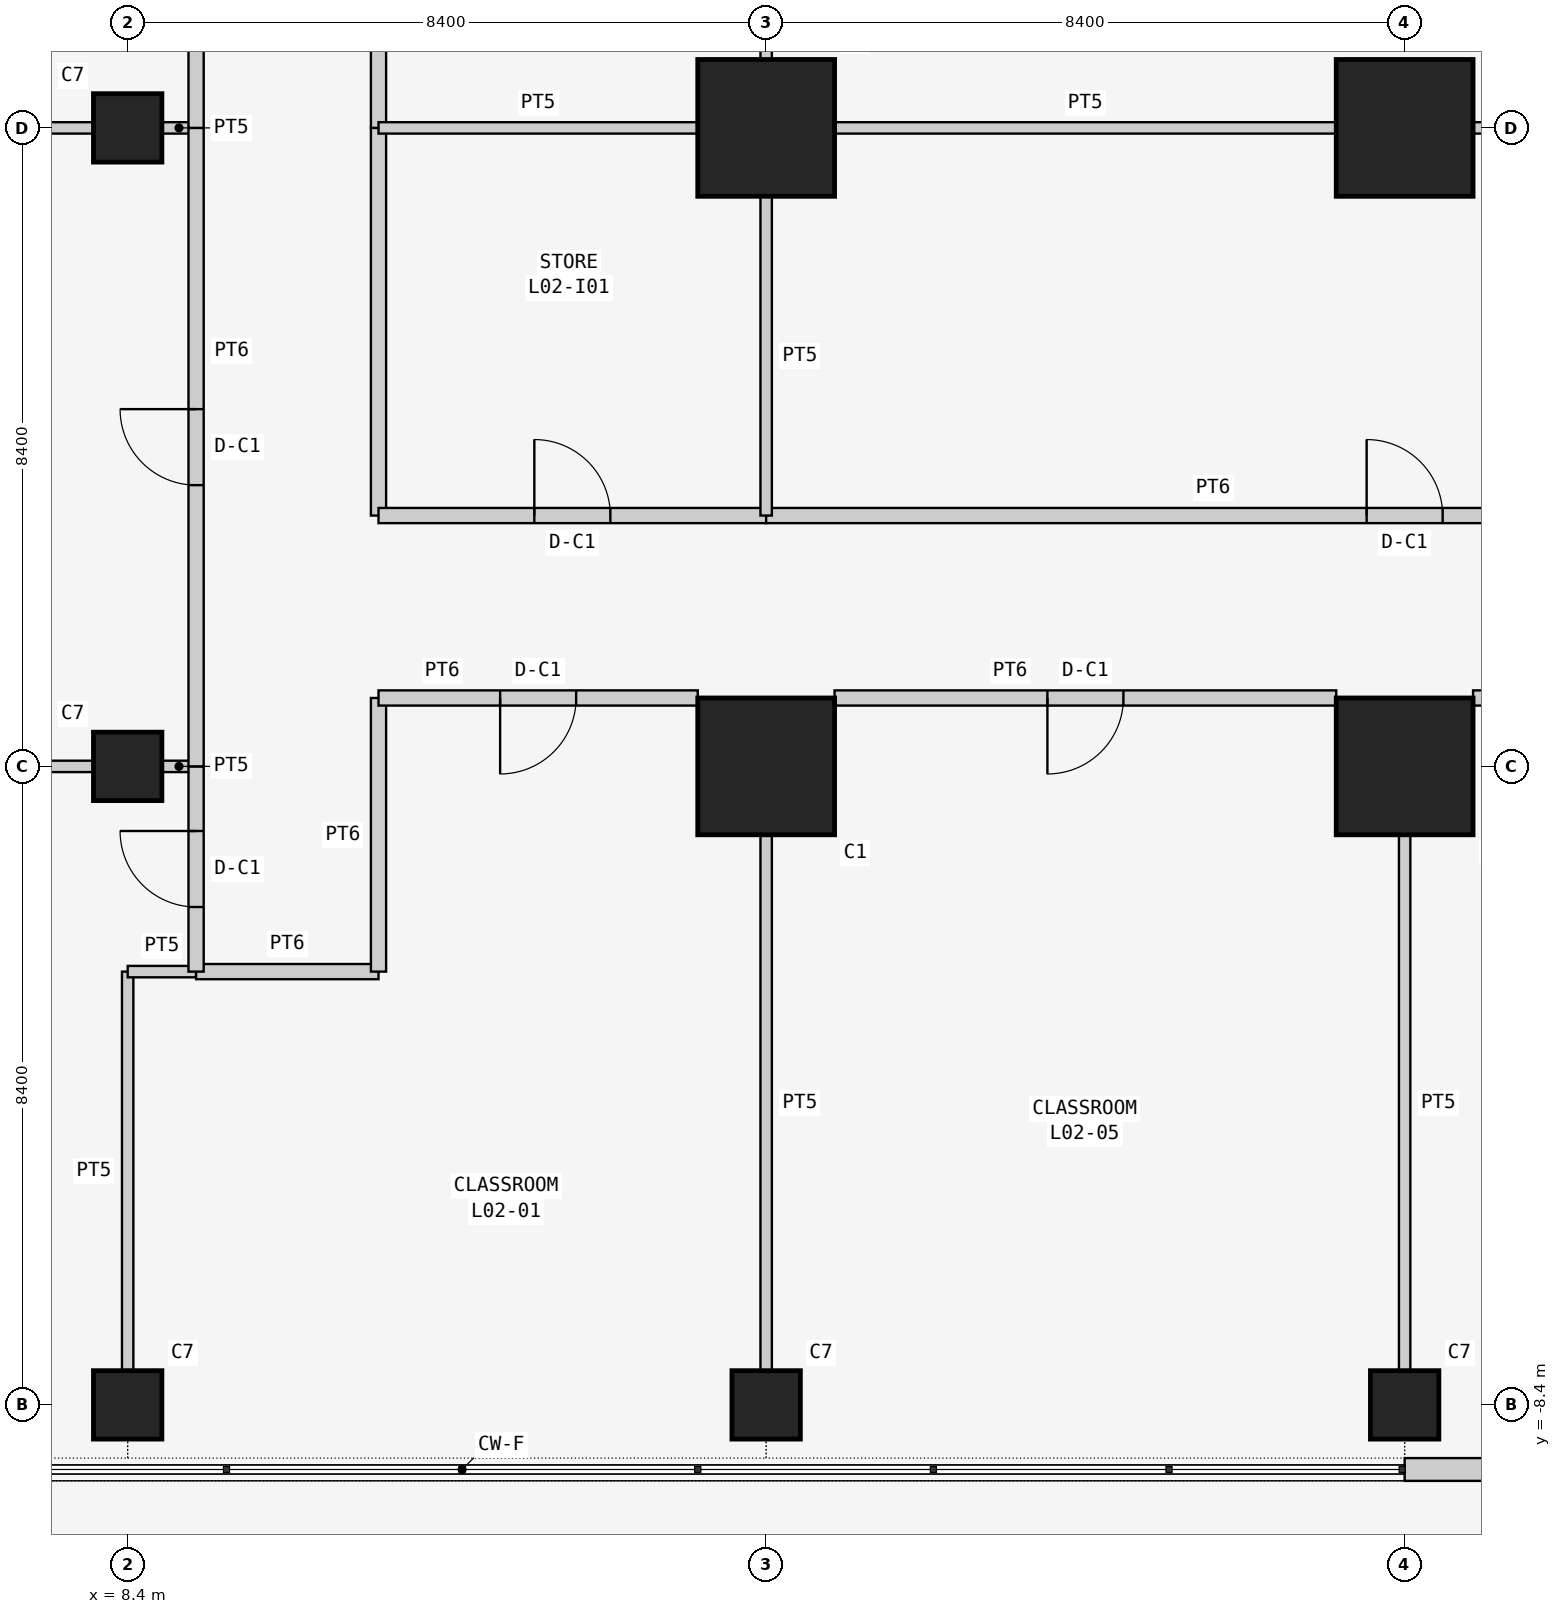
"""IFC4 building model, lengths in metres.
Left out: names, types, materials, properties, quantities, classifications, styles, units other than length and angle.
Written with IfcOpenShell. Run it as: python <this file> out.ifc"""

import sys

from ifc_helpers import new_model, si_unit, direction, frame, frame_2d, origin, origin_2d, place, context, subcontext, project, spatial, rectangle, extrude, element, fill, save


model = new_model("IFC4")
c1 = context("Model", 3, precision=1e-05, world=origin(), true_north=direction((0.0, 1.0)))
c2 = subcontext(c1, "Body", "Model", "MODEL_VIEW")
j1 = project(units=[si_unit("LENGTHUNIT", "METRE"), si_unit("PLANEANGLEUNIT", "RADIAN")], contexts=[c1])
p1 = place(None, origin())
s1 = spatial("IfcSite", under=j1, at=p1, CompositionType="ELEMENT")
p2 = place(p1, origin())
s2 = spatial("IfcBuilding", under=s1, at=p2, CompositionType="ELEMENT")
p3 = place(p2, frame((0.0, 0.0, 10.5)))
s3 = spatial("IfcBuildingStorey", under=s2, at=p3, CompositionType="ELEMENT", Elevation=10.5)
for number, where, z_axis, x_axis in (
    (1, (8.4, -8.4, 0.0), (0.0, 0.0, 1.0), (1.0, 0.0, 0.0)),
    (2, (8.4, 0.0, 0.0), (0.0, 0.0, 1.0), (1.0, 0.0, 0.0)),
    (3, (8.4, 8.4, 0.0), (0.0, 0.0, 1.0), (1.0, 0.0, 0.0)),
    (4, (16.8, -8.4, 0.0), (0.0, 0.0, 1.0), (1.0, 0.0, 0.0)),
):
    element("IfcColumn", number, at=place(p3, frame(where, z_axis=z_axis, x_axis=x_axis)), inside=s3, PredefinedType="COLUMN", context=c2, shape_type="SweptSolid", body=[
        extrude(rectangle(XDim=0.9, YDim=0.9, at=origin_2d()), origin(), (0.0, 0.0, 1.0), 4.5),
    ])
for number, where, z_axis, x_axis in (
    (5, (16.8, 0.0, 0.0), (0.0, 0.0, 1.0), (1.0, 0.0, 0.0)),
    (6, (16.8, 8.4, 0.0), (0.0, 0.0, 1.0), (1.0, 0.0, 0.0)),
):
    element("IfcColumn", number, at=place(p3, frame(where, z_axis=z_axis, x_axis=x_axis)), inside=s3, PredefinedType="COLUMN", context=c2, shape_type="SweptSolid", body=[
        extrude(rectangle(XDim=1.8, YDim=1.8, at=origin_2d()), origin(), (0.0, 0.0, 1.0), 4.5),
    ])
p4 = place(p3, frame((25.2, -8.4, 0.0), z_axis=(0.0, 0.0, 1.0), x_axis=(1.0, 0.0, 0.0)))
e7 = element("IfcColumn", 7, at=p4, inside=s3, PredefinedType="COLUMN", context=c2, shape_type="SweptSolid", body=[
    extrude(rectangle(XDim=0.9, YDim=0.9, at=origin_2d()), origin(), (0.0, 0.0, 1.0), 4.5),
])
for number, where, z_axis, x_axis in (
    (8, (25.2, 0.0, 0.0), (0.0, 0.0, 1.0), (1.0, 0.0, 0.0)),
    (9, (25.2, 8.4, 0.0), (0.0, 0.0, 1.0), (1.0, 0.0, 0.0)),
):
    element("IfcColumn", number, at=place(p3, frame(where, z_axis=z_axis, x_axis=x_axis)), inside=s3, PredefinedType="COLUMN", context=c2, shape_type="SweptSolid", body=[
        extrude(rectangle(XDim=1.8, YDim=1.8, at=origin_2d()), origin(), (0.0, 0.0, 1.0), 4.5),
    ])
p5 = place(p3, frame((25.2, -9.25, 0.0), z_axis=(0.0, 0.0, 1.0), x_axis=(1.0, 0.0, 0.0)))
e10 = element("IfcWall", 10, at=p5, inside=s3, PredefinedType="SOLIDWALL", context=c2, shape_type="SweptSolid", body=[
    extrude(rectangle(XDim=8.4, YDim=0.3, at=frame_2d((4.2, 0.0))), origin(), (0.0, 0.0, 1.0), 4.3),
])
p6 = place(p5, frame((1.6, 0.0, 0.0)))
e11 = element("IfcOpeningElement", 11, at=p6, cuts=e10, PredefinedType="OPENING", context=c2, shape_type="SweptSolid", body=[
    extrude(rectangle(XDim=1.0, YDim=2.4, at=frame_2d((0.5, 1.2))), frame((0.0, 0.16, 0.0), z_axis=(0.0, -1.0, 0.0), x_axis=(1.0, 0.0, 0.0)), (0.0, 0.0, 1.0), 0.32),
])
p7 = place(p5, frame((5.8, 0.0, 0.0)))
e12 = element("IfcOpeningElement", 12, at=p7, cuts=e10, PredefinedType="OPENING", context=c2, shape_type="SweptSolid", body=[
    extrude(rectangle(XDim=1.0, YDim=2.4, at=frame_2d((0.5, 1.2))), frame((0.0, 0.16, 0.0), z_axis=(0.0, -1.0, 0.0), x_axis=(1.0, 0.0, 0.0)), (0.0, 0.0, 1.0), 0.32),
])
p8 = place(p3, frame((8.4, -7.95, 0.0), z_axis=(0.0, 0.0, 1.0), x_axis=(0.0, 1.0, 0.0)))
e13 = element("IfcWall", 13, at=p8, inside=s3, PredefinedType="PARTITIONING", context=c2, shape_type="SweptSolid", body=[
    extrude(rectangle(XDim=5.25, YDim=0.15, at=frame_2d((2.625, 0.0))), origin(), (0.0, 0.0, 1.0), 3.543),
])
p9 = place(p3, frame((8.4, -2.7, 0.0), z_axis=(0.0, 0.0, 1.0), x_axis=(1.0, 0.0, 0.0)))
e14 = element("IfcWall", 14, at=p9, inside=s3, PredefinedType="PARTITIONING", context=c2, shape_type="SweptSolid", body=[
    extrude(rectangle(XDim=0.9, YDim=0.15, at=frame_2d((0.45, 0.0))), origin(), (0.0, 0.0, 1.0), 4.3),
])
p10 = place(p3, frame((16.8, -0.9, 0.0), z_axis=(0.0, 0.0, 1.0), x_axis=(0.0, -1.0, 0.0)))
e15 = element("IfcWall", 15, at=p10, inside=s3, PredefinedType="PARTITIONING", context=c2, shape_type="SweptSolid", body=[
    extrude(rectangle(XDim=7.05, YDim=0.15, at=frame_2d((3.525, 0.0))), origin(), (0.0, 0.0, 1.0), 3.543),
])
p11 = place(p3, frame((9.3, -2.7, 0.0), z_axis=(0.0, 0.0, 1.0), x_axis=(1.0, 0.0, 0.0)))
e16 = element("IfcWall", 16, at=p11, inside=s3, PredefinedType="PARTITIONING", context=c2, shape_type="SweptSolid", body=[
    extrude(rectangle(XDim=2.4, YDim=0.2, at=frame_2d((1.2, 0.0))), origin(), (0.0, 0.0, 1.0), 4.3),
])
p12 = place(p3, frame((11.7, -2.7, 0.0), z_axis=(0.0, 0.0, 1.0), x_axis=(0.0, 1.0, 0.0)))
e17 = element("IfcWall", 17, at=p12, inside=s3, PredefinedType="PARTITIONING", context=c2, shape_type="SweptSolid", body=[
    extrude(rectangle(XDim=3.6, YDim=0.2, at=frame_2d((1.8, 0.0))), origin(), (0.0, 0.0, 1.0), 4.3),
])
p13 = place(p3, frame((11.7, 0.9, 0.0), z_axis=(0.0, 0.0, 1.0), x_axis=(1.0, 0.0, 0.0)))
e18 = element("IfcWall", 18, at=p13, inside=s3, PredefinedType="PARTITIONING", context=c2, shape_type="SweptSolid", body=[
    extrude(rectangle(XDim=4.2, YDim=0.2, at=frame_2d((2.1, 0.0))), origin(), (0.0, 0.0, 1.0), 4.3),
])
p14 = place(p13, frame((1.6, 0.0, 0.0)))
e19 = element("IfcOpeningElement", 19, at=p14, cuts=e18, PredefinedType="OPENING", context=c2, shape_type="SweptSolid", body=[
    extrude(rectangle(XDim=1.0, YDim=2.1, at=frame_2d((0.5, 1.05))), frame((0.0, 0.11, 0.0), z_axis=(0.0, -1.0, 0.0), x_axis=(1.0, 0.0, 0.0)), (0.0, 0.0, 1.0), 0.22),
])
p15 = place(p3, frame((0.45, 0.0, 0.0), z_axis=(0.0, 0.0, 1.0), x_axis=(1.0, 0.0, 0.0)))
e20 = element("IfcWall", 20, at=p15, inside=s3, PredefinedType="PARTITIONING", context=c2, shape_type="SweptSolid", body=[
    extrude(rectangle(XDim=7.5, YDim=0.15, at=frame_2d((3.75, 0.0))), origin(), (0.0, 0.0, 1.0), 3.543),
])
p16 = place(p3, frame((8.85, 0.0, 0.0), z_axis=(0.0, 0.0, 1.0), x_axis=(1.0, 0.0, 0.0)))
e21 = element("IfcWall", 21, at=p16, inside=s3, PredefinedType="PARTITIONING", context=c2, shape_type="SweptSolid", body=[
    extrude(rectangle(XDim=0.45, YDim=0.15, at=frame_2d((0.225, 0.0))), origin(), (0.0, 0.0, 1.0), 3.543),
])
p17 = place(p3, frame((9.3, 0.0, 0.0), z_axis=(0.0, 0.0, 1.0), x_axis=(0.0, -1.0, 0.0)))
e22 = element("IfcWall", 22, at=p17, inside=s3, PredefinedType="PARTITIONING", context=c2, shape_type="SweptSolid", body=[
    extrude(rectangle(XDim=2.7, YDim=0.2, at=frame_2d((1.35, 0.0))), origin(), (0.0, 0.0, 1.0), 4.3),
])
p18 = place(p17, frame((0.85, 0.0, 0.0)))
e23 = element("IfcOpeningElement", 23, at=p18, cuts=e22, PredefinedType="OPENING", context=c2, shape_type="SweptSolid", body=[
    extrude(rectangle(XDim=1.0, YDim=2.1, at=frame_2d((0.5, 1.05))), frame((0.0, 0.11, 0.0), z_axis=(0.0, -1.0, 0.0), x_axis=(1.0, 0.0, 0.0)), (0.0, 0.0, 1.0), 0.22),
])
p19 = place(p3, frame((25.2, -0.9, 0.0), z_axis=(0.0, 0.0, 1.0), x_axis=(0.0, -1.0, 0.0)))
e24 = element("IfcWall", 24, at=p19, inside=s3, PredefinedType="PARTITIONING", context=c2, shape_type="SweptSolid", body=[
    extrude(rectangle(XDim=7.05, YDim=0.15, at=frame_2d((3.525, 0.0))), origin(), (0.0, 0.0, 1.0), 3.543),
])
p20 = place(p3, frame((17.7, 0.9, 0.0), z_axis=(0.0, 0.0, 1.0), x_axis=(1.0, 0.0, 0.0)))
e25 = element("IfcWall", 25, at=p20, inside=s3, PredefinedType="PARTITIONING", context=c2, shape_type="SweptSolid", body=[
    extrude(rectangle(XDim=6.6, YDim=0.2, at=frame_2d((3.3, 0.0))), origin(), (0.0, 0.0, 1.0), 4.3),
])
p21 = place(p20, frame((2.8, 0.0, 0.0)))
e26 = element("IfcOpeningElement", 26, at=p21, cuts=e25, PredefinedType="OPENING", context=c2, shape_type="SweptSolid", body=[
    extrude(rectangle(XDim=1.0, YDim=2.1, at=frame_2d((0.5, 1.05))), frame((0.0, 0.11, 0.0), z_axis=(0.0, -1.0, 0.0), x_axis=(1.0, 0.0, 0.0)), (0.0, 0.0, 1.0), 0.22),
])
p22 = place(p3, frame((26.1, 0.9, 0.0), z_axis=(0.0, 0.0, 1.0), x_axis=(1.0, 0.0, 0.0)))
e27 = element("IfcWall", 27, at=p22, inside=s3, PredefinedType="PARTITIONING", context=c2, shape_type="SweptSolid", body=[
    extrude(rectangle(XDim=6.6, YDim=0.2, at=frame_2d((3.3, 0.0))), origin(), (0.0, 0.0, 1.0), 4.3),
])
p23 = place(p22, frame((2.8, 0.0, 0.0)))
e28 = element("IfcOpeningElement", 28, at=p23, cuts=e27, PredefinedType="OPENING", context=c2, shape_type="SweptSolid", body=[
    extrude(rectangle(XDim=1.0, YDim=2.1, at=frame_2d((0.5, 1.05))), frame((0.0, 0.11, 0.0), z_axis=(0.0, -1.0, 0.0), x_axis=(1.0, 0.0, 0.0)), (0.0, 0.0, 1.0), 0.22),
])
p24 = place(p3, frame((0.45, 8.4, 0.0), z_axis=(0.0, 0.0, 1.0), x_axis=(1.0, 0.0, 0.0)))
e29 = element("IfcWall", 29, at=p24, inside=s3, PredefinedType="PARTITIONING", context=c2, shape_type="SweptSolid", body=[
    extrude(rectangle(XDim=7.5, YDim=0.15, at=frame_2d((3.75, 0.0))), origin(), (0.0, 0.0, 1.0), 3.543),
])
p25 = place(p3, frame((8.85, 8.4, 0.0), z_axis=(0.0, 0.0, 1.0), x_axis=(1.0, 0.0, 0.0)))
e30 = element("IfcWall", 30, at=p25, inside=s3, PredefinedType="PARTITIONING", context=c2, shape_type="SweptSolid", body=[
    extrude(rectangle(XDim=0.45, YDim=0.15, at=frame_2d((0.225, 0.0))), origin(), (0.0, 0.0, 1.0), 3.543),
])
p26 = place(p3, frame((9.3, 8.4, 0.0), z_axis=(0.0, 0.0, 1.0), x_axis=(0.0, -1.0, 0.0)))
e31 = element("IfcWall", 31, at=p26, inside=s3, PredefinedType="PARTITIONING", context=c2, shape_type="SweptSolid", body=[
    extrude(rectangle(XDim=8.4, YDim=0.2, at=frame_2d((4.2, 0.0))), origin(), (0.0, 0.0, 1.0), 4.3),
])
p27 = place(p26, frame((3.7, 0.0, 0.0)))
e32 = element("IfcOpeningElement", 32, at=p27, cuts=e31, PredefinedType="OPENING", context=c2, shape_type="SweptSolid", body=[
    extrude(rectangle(XDim=1.0, YDim=2.1, at=frame_2d((0.5, 1.05))), frame((0.0, 0.11, 0.0), z_axis=(0.0, -1.0, 0.0), x_axis=(1.0, 0.0, 0.0)), (0.0, 0.0, 1.0), 0.22),
])
p28 = place(p3, frame((9.3, 15.9, 0.0), z_axis=(0.0, 0.0, 1.0), x_axis=(0.0, -1.0, 0.0)))
e33 = element("IfcWall", 33, at=p28, inside=s3, PredefinedType="PARTITIONING", context=c2, shape_type="SweptSolid", body=[
    extrude(rectangle(XDim=7.5, YDim=0.2, at=frame_2d((3.75, 0.0))), origin(), (0.0, 0.0, 1.0), 4.3),
])
p29 = place(p28, frame((3.25, 0.0, 0.0)))
e34 = element("IfcOpeningElement", 34, at=p29, cuts=e33, PredefinedType="OPENING", context=c2, shape_type="SweptSolid", body=[
    extrude(rectangle(XDim=1.0, YDim=2.1, at=frame_2d((0.5, 1.05))), frame((0.0, 0.11, 0.0), z_axis=(0.0, -1.0, 0.0), x_axis=(1.0, 0.0, 0.0)), (0.0, 0.0, 1.0), 0.22),
])
p30 = place(p3, frame((11.7, 8.4, 0.0), z_axis=(0.0, 0.0, 1.0), x_axis=(0.0, -1.0, 0.0)))
e35 = element("IfcWall", 35, at=p30, inside=s3, PredefinedType="PARTITIONING", context=c2, shape_type="SweptSolid", body=[
    extrude(rectangle(XDim=5.1, YDim=0.2, at=frame_2d((2.55, 0.0))), origin(), (0.0, 0.0, 1.0), 4.3),
])
p31 = place(p3, frame((11.7, 3.3, 0.0), z_axis=(0.0, 0.0, 1.0), x_axis=(1.0, 0.0, 0.0)))
e36 = element("IfcWall", 36, at=p31, inside=s3, PredefinedType="PARTITIONING", context=c2, shape_type="SweptSolid", body=[
    extrude(rectangle(XDim=5.1, YDim=0.2, at=frame_2d((2.55, 0.0))), origin(), (0.0, 0.0, 1.0), 4.3),
])
p32 = place(p31, frame((2.05, 0.0, 0.0)))
e37 = element("IfcOpeningElement", 37, at=p32, cuts=e36, PredefinedType="OPENING", context=c2, shape_type="SweptSolid", body=[
    extrude(rectangle(XDim=1.0, YDim=2.1, at=frame_2d((0.5, 1.05))), frame((0.0, 0.11, 0.0), z_axis=(0.0, -1.0, 0.0), x_axis=(1.0, 0.0, 0.0)), (0.0, 0.0, 1.0), 0.22),
])
p33 = place(p3, frame((16.8, 3.3, 0.0), z_axis=(0.0, 0.0, 1.0), x_axis=(1.0, 0.0, 0.0)))
e38 = element("IfcWall", 38, at=p33, inside=s3, PredefinedType="PARTITIONING", context=c2, shape_type="SweptSolid", body=[
    extrude(rectangle(XDim=16.8, YDim=0.2, at=frame_2d((8.4, 0.0))), origin(), (0.0, 0.0, 1.0), 4.3),
])
p34 = place(p33, frame((7.9, 0.0, 0.0)))
e39 = element("IfcOpeningElement", 39, at=p34, cuts=e38, PredefinedType="OPENING", context=c2, shape_type="SweptSolid", body=[
    extrude(rectangle(XDim=1.0, YDim=2.1, at=frame_2d((0.5, 1.05))), frame((0.0, 0.11, 0.0), z_axis=(0.0, -1.0, 0.0), x_axis=(1.0, 0.0, 0.0)), (0.0, 0.0, 1.0), 0.22),
])
p35 = place(p3, frame((11.7, 16.8, 0.0), z_axis=(0.0, 0.0, 1.0), x_axis=(0.0, -1.0, 0.0)))
e40 = element("IfcWall", 40, at=p35, inside=s3, PredefinedType="PARTITIONING", context=c2, shape_type="SweptSolid", body=[
    extrude(rectangle(XDim=8.4, YDim=0.2, at=frame_2d((4.2, 0.0))), origin(), (0.0, 0.0, 1.0), 4.3),
])
p36 = place(p35, frame((3.7, 0.0, 0.0)))
e41 = element("IfcOpeningElement", 41, at=p36, cuts=e40, PredefinedType="OPENING", context=c2, shape_type="SweptSolid", body=[
    extrude(rectangle(XDim=1.0, YDim=2.1, at=frame_2d((0.5, 1.05))), frame((0.0, 0.11, 0.0), z_axis=(0.0, -1.0, 0.0), x_axis=(1.0, 0.0, 0.0)), (0.0, 0.0, 1.0), 0.22),
])
for number, where, z_axis, x_axis in (
    (42, (16.8, 7.5, 0.0), (0.0, 0.0, 1.0), (0.0, -1.0, 0.0)),
    (43, (11.7, 8.4, 0.0), (0.0, 0.0, 1.0), (1.0, 0.0, 0.0)),
):
    element("IfcWall", number, at=place(p3, frame(where, z_axis=z_axis, x_axis=x_axis)), inside=s3, PredefinedType="PARTITIONING", context=c2, shape_type="SweptSolid", body=[
        extrude(rectangle(XDim=4.2, YDim=0.15, at=frame_2d((2.1, 0.0))), origin(), (0.0, 0.0, 1.0), 3.543),
    ])
p37 = place(p3, frame((17.7, 8.4, 0.0), z_axis=(0.0, 0.0, 1.0), x_axis=(1.0, 0.0, 0.0)))
e44 = element("IfcWall", 44, at=p37, inside=s3, PredefinedType="PARTITIONING", context=c2, shape_type="SweptSolid", body=[
    extrude(rectangle(XDim=6.6, YDim=0.15, at=frame_2d((3.3, 0.0))), origin(), (0.0, 0.0, 1.0), 3.543),
])
for number, where, z_axis, x_axis in (
    (45, (26.1, 8.4, 0.0), (0.0, 0.0, 1.0), (1.0, 0.0, 0.0)),
    (46, (16.8, 15.9, 0.0), (0.0, 0.0, 1.0), (0.0, -1.0, 0.0)),
):
    element("IfcWall", number, at=place(p3, frame(where, z_axis=z_axis, x_axis=x_axis)), inside=s3, PredefinedType="PARTITIONING", context=c2, shape_type="SweptSolid", body=[
        extrude(rectangle(XDim=6.6, YDim=0.15, at=frame_2d((3.3, 0.0))), origin(), (0.0, 0.0, 1.0), 3.543),
    ])
p38 = place(p14, frame((1.0, 0.0, 0.0), z_axis=(0.0, 0.0, 1.0), x_axis=(-1.0, 0.0, 0.0)))
e47 = element("IfcDoor", 47, at=p38, inside=s3, OperationType="SINGLE_SWING_RIGHT", PredefinedType="DOOR", context=c2, shape_type="SweptSolid", body=[
    extrude(rectangle(XDim=1.0, YDim=2.1, at=frame_2d((0.5, 1.05))), frame((0.0, 0.025, 0.0), z_axis=(0.0, -1.0, 0.0), x_axis=(1.0, 0.0, 0.0)), (0.0, 0.0, 1.0), 0.05),
])
fill(e19, e47)
p39 = place(p18, frame((1.0, 0.0, 0.0), z_axis=(0.0, 0.0, 1.0), x_axis=(-1.0, 0.0, 0.0)))
e48 = element("IfcDoor", 48, at=p39, inside=s3, OperationType="SINGLE_SWING_RIGHT", PredefinedType="DOOR", context=c2, shape_type="SweptSolid", body=[
    extrude(rectangle(XDim=1.0, YDim=2.1, at=frame_2d((0.5, 1.05))), frame((0.0, 0.025, 0.0), z_axis=(0.0, -1.0, 0.0), x_axis=(1.0, 0.0, 0.0)), (0.0, 0.0, 1.0), 0.05),
])
fill(e23, e48)
p40 = place(p21, frame((1.0, 0.0, 0.0), z_axis=(0.0, 0.0, 1.0), x_axis=(-1.0, 0.0, 0.0)))
e49 = element("IfcDoor", 49, at=p40, inside=s3, OperationType="SINGLE_SWING_RIGHT", PredefinedType="DOOR", context=c2, shape_type="SweptSolid", body=[
    extrude(rectangle(XDim=1.0, YDim=2.1, at=frame_2d((0.5, 1.05))), frame((0.0, 0.025, 0.0), z_axis=(0.0, -1.0, 0.0), x_axis=(1.0, 0.0, 0.0)), (0.0, 0.0, 1.0), 0.05),
])
fill(e26, e49)
p41 = place(p27, frame((1.0, 0.0, 0.0), z_axis=(0.0, 0.0, 1.0), x_axis=(-1.0, 0.0, 0.0)))
e50 = element("IfcDoor", 50, at=p41, inside=s3, OperationType="SINGLE_SWING_RIGHT", PredefinedType="DOOR", context=c2, shape_type="SweptSolid", body=[
    extrude(rectangle(XDim=1.0, YDim=2.1, at=frame_2d((0.5, 1.05))), frame((0.0, 0.025, 0.0), z_axis=(0.0, -1.0, 0.0), x_axis=(1.0, 0.0, 0.0)), (0.0, 0.0, 1.0), 0.05),
])
fill(e32, e50)
p42 = place(p32, origin())
e51 = element("IfcDoor", 51, at=p42, inside=s3, OperationType="SINGLE_SWING_LEFT", PredefinedType="DOOR", context=c2, shape_type="SweptSolid", body=[
    extrude(rectangle(XDim=1.0, YDim=2.1, at=frame_2d((0.5, 1.05))), frame((0.0, 0.025, 0.0), z_axis=(0.0, -1.0, 0.0), x_axis=(1.0, 0.0, 0.0)), (0.0, 0.0, 1.0), 0.05),
])
fill(e37, e51)
p43 = place(p34, origin())
e52 = element("IfcDoor", 52, at=p43, inside=s3, OperationType="SINGLE_SWING_LEFT", PredefinedType="DOOR", context=c2, shape_type="SweptSolid", body=[
    extrude(rectangle(XDim=1.0, YDim=2.1, at=frame_2d((0.5, 1.05))), frame((0.0, 0.025, 0.0), z_axis=(0.0, -1.0, 0.0), x_axis=(1.0, 0.0, 0.0)), (0.0, 0.0, 1.0), 0.05),
])
fill(e39, e52)
save(model, sys.argv[1])
